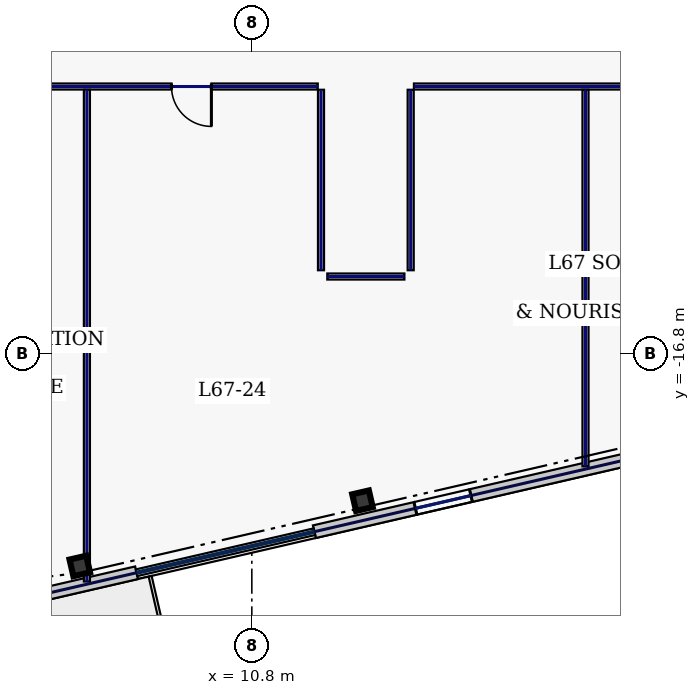
"""IFC4 building model, lengths in metres.
Left out: names, types, materials, properties, quantities, classifications, styles, units other than length and angle.
Written with IfcOpenShell. Run it as: python <this file> out.ifc"""

import sys

from ifc_helpers import new_model, si_unit, direction, frame, frame_2d, origin, origin_2d, place, context, subcontext, project, spatial, rectangle, hollow_rectangle, extrude, element, fill, save


model = new_model("IFC4")
c1 = context("Model", 3, precision=1e-05, world=origin(), true_north=direction((0.0, 1.0)))
c2 = subcontext(c1, "Body", "Model", "MODEL_VIEW")
j1 = project(units=[si_unit("LENGTHUNIT", "METRE"), si_unit("PLANEANGLEUNIT", "RADIAN")], contexts=[c1])
p1 = place(None, origin())
s1 = spatial("IfcSite", under=j1, at=p1, CompositionType="ELEMENT")
p2 = place(p1, origin())
s2 = spatial("IfcBuilding", under=s1, at=p2, CompositionType="ELEMENT")
p3 = place(p2, frame((0.0, 0.0, 289.0)))
s3 = spatial("IfcBuildingStorey", under=s2, at=p3, CompositionType="ELEMENT", Elevation=289.0)
for number, where, z_axis, x_axis in (
    (1, (6.273, -22.397, 0.0), (0.0, 0.0, 1.0), (0.974, 0.225, 0.0)),
    (2, (13.711, -20.68, 0.0), (0.0, 0.0, 1.0), (0.974, 0.225, 0.0)),
):
    element("IfcColumn", number, at=place(p3, frame(where, z_axis=z_axis, x_axis=x_axis)), inside=s3, PredefinedType="COLUMN", context=c2, shape_type="SweptSolid", body=[
        extrude(hollow_rectangle(XDim=0.45, YDim=0.45, WallThickness=0.022, at=origin_2d()), origin(), (0.0, 0.0, 1.0), 3.74),
    ])
p4 = place(p3, frame((-2.295, -24.898, 0.0), z_axis=(0.0, 0.0, 1.0), x_axis=(0.974370872906, 0.224947553958, 0.0)))
e3 = element("IfcWall", 3, at=p4, inside=s3, PredefinedType="STANDARD", context=c2, shape_type="SweptSolid", body=[
    extrude(rectangle(XDim=10.328, YDim=0.34, at=frame_2d((5.164, 0.0))), origin(), (0.0, 0.0, 1.0), 3.74),
])
p5 = place(p4, frame((4.394, 0.0, 0.0)))
e4 = element("IfcOpeningElement", 4, at=p5, cuts=e3, PredefinedType="OPENING", context=c2, shape_type="SweptSolid", body=[
    extrude(rectangle(XDim=1.4, YDim=2.2, at=frame_2d((0.7, 1.1))), frame((0.0, 0.18, 0.0), z_axis=(0.0, -1.0, 0.0), x_axis=(1.0, 0.0, 0.0)), (0.0, 0.0, 1.0), 0.36),
])
p6 = place(p4, frame((2.655, 0.0, 0.9)))
e5 = element("IfcOpeningElement", 5, at=p6, cuts=e3, PredefinedType="OPENING", context=c2, shape_type="SweptSolid", body=[
    extrude(rectangle(XDim=0.85, YDim=1.85, at=frame_2d((0.425, 0.925))), frame((0.0, 0.18, 0.0), z_axis=(0.0, -1.0, 0.0), x_axis=(1.0, 0.0, 0.0)), (0.0, 0.0, 1.0), 0.36),
])
p7 = place(p4, frame((6.774, 0.0, 0.9)))
e6 = element("IfcOpeningElement", 6, at=p7, cuts=e3, PredefinedType="OPENING", context=c2, shape_type="SweptSolid", body=[
    extrude(rectangle(XDim=0.85, YDim=1.85, at=frame_2d((0.425, 0.925))), frame((0.0, 0.18, 0.0), z_axis=(0.0, -1.0, 0.0), x_axis=(1.0, 0.0, 0.0)), (0.0, 0.0, 1.0), 0.36),
])
p8 = place(p3, frame((12.445, -21.495, 0.0), z_axis=(0.0, 0.0, 1.0), x_axis=(0.974369392164, 0.224953967767, 0.0)))
e7 = element("IfcWall", 7, at=p8, inside=s3, PredefinedType="STANDARD", context=c2, shape_type="SweptSolid", body=[
    extrude(rectangle(XDim=17.366, YDim=0.34, at=frame_2d((8.683, 0.0))), origin(), (0.0, 0.0, 1.0), 3.74),
])
p9 = place(p8, frame((2.729, 0.0, 0.9)))
e8 = element("IfcOpeningElement", 8, at=p9, cuts=e7, PredefinedType="OPENING", context=c2, shape_type="SweptSolid", body=[
    extrude(rectangle(XDim=1.5, YDim=2.0, at=frame_2d((0.75, 1.0))), frame((0.0, 0.18, 0.0), z_axis=(0.0, -1.0, 0.0), x_axis=(1.0, 0.0, 0.0)), (0.0, 0.0, 1.0), 0.36),
])
p10 = place(p8, frame((10.363, 0.0, 0.9)))
e9 = element("IfcOpeningElement", 9, at=p10, cuts=e7, PredefinedType="OPENING", context=c2, shape_type="SweptSolid", body=[
    extrude(rectangle(XDim=0.85, YDim=1.85, at=frame_2d((0.425, 0.925))), frame((0.0, 0.18, 0.0), z_axis=(0.0, -1.0, 0.0), x_axis=(1.0, 0.0, 0.0)), (0.0, 0.0, 1.0), 0.36),
])
p11 = place(p8, frame((13.875, 0.0, 0.9)))
e10 = element("IfcOpeningElement", 10, at=p11, cuts=e7, PredefinedType="OPENING", context=c2, shape_type="SweptSolid", body=[
    extrude(rectangle(XDim=1.5, YDim=2.0, at=frame_2d((0.75, 1.0))), frame((0.0, 0.18, 0.0), z_axis=(0.0, -1.0, 0.0), x_axis=(1.0, 0.0, 0.0)), (0.0, 0.0, 1.0), 0.36),
])
p12 = place(p3, frame((24.145, -9.78, 0.0), z_axis=(0.0, 0.0, 1.0), x_axis=(-1.0, 0.0, 0.0)))
e11 = element("IfcWall", 11, at=p12, inside=s3, PredefinedType="PARTITIONING", context=c2, shape_type="SweptSolid", body=[
    extrude(rectangle(XDim=9.08, YDim=0.16, at=frame_2d((4.54, 0.0))), origin(), (0.0, 0.0, 1.0), 3.74),
])
p13 = place(p12, frame((2.044, 0.0, 0.0)))
e12 = element("IfcOpeningElement", 12, at=p13, cuts=e11, PredefinedType="OPENING", context=c2, shape_type="SweptSolid", body=[
    extrude(rectangle(XDim=1.15, YDim=2.2, at=frame_2d((0.575, 1.1))), frame((0.0, 0.09, 0.0), z_axis=(0.0, -1.0, 0.0), x_axis=(1.0, 0.0, 0.0)), (0.0, 0.0, 1.0), 0.18),
])
p14 = place(p3, frame((14.98, -9.865, 0.0), z_axis=(0.0, 0.0, 1.0), x_axis=(0.0, -1.0, 0.0)))
e13 = element("IfcWall", 13, at=p14, inside=s3, PredefinedType="PARTITIONING", context=c2, shape_type="SweptSolid", body=[
    extrude(rectangle(XDim=4.75, YDim=0.16, at=frame_2d((2.375, 0.0))), origin(), (0.0, 0.0, 1.0), 3.74),
])
p15 = place(p3, frame((14.815, -14.78, 0.0), z_axis=(0.0, 0.0, 1.0), x_axis=(-1.0, 0.0, 0.0)))
e14 = element("IfcWall", 14, at=p15, inside=s3, PredefinedType="PARTITIONING", context=c2, shape_type="SweptSolid", body=[
    extrude(rectangle(XDim=2.03, YDim=0.16, at=frame_2d((1.015, 0.0))), origin(), (0.0, 0.0, 1.0), 3.74),
])
p16 = place(p3, frame((12.62, -14.615, 0.0), z_axis=(0.0, 0.0, 1.0), x_axis=(0.0, 1.0, 0.0)))
e15 = element("IfcWall", 15, at=p16, inside=s3, PredefinedType="PARTITIONING", context=c2, shape_type="SweptSolid", body=[
    extrude(rectangle(XDim=4.75, YDim=0.16, at=frame_2d((2.375, 0.0))), origin(), (0.0, 0.0, 1.0), 3.74),
])
p17 = place(p3, frame((12.535, -9.78, 0.0), z_axis=(0.0, 0.0, 1.0), x_axis=(-1.0, 0.0, 0.0)))
e16 = element("IfcWall", 16, at=p17, inside=s3, PredefinedType="PARTITIONING", context=c2, shape_type="SweptSolid", body=[
    extrude(rectangle(XDim=36.68, YDim=0.16, at=frame_2d((18.34, 0.0))), origin(), (0.0, 0.0, 1.0), 3.74),
])
p18 = place(p17, frame((33.856, 0.0, 0.0)))
e17 = element("IfcOpeningElement", 17, at=p18, cuts=e16, PredefinedType="OPENING", context=c2, shape_type="SweptSolid", body=[
    extrude(rectangle(XDim=1.05, YDim=2.2, at=frame_2d((0.525, 1.1))), frame((0.0, 0.09, 0.0), z_axis=(0.0, -1.0, 0.0), x_axis=(1.0, 0.0, 0.0)), (0.0, 0.0, 1.0), 0.18),
])
p19 = place(p17, frame((28.43, 0.0, 0.0)))
e18 = element("IfcOpeningElement", 18, at=p19, cuts=e16, PredefinedType="OPENING", context=c2, shape_type="SweptSolid", body=[
    extrude(rectangle(XDim=1.3, YDim=2.2, at=frame_2d((0.65, 1.1))), frame((0.0, 0.09, 0.0), z_axis=(0.0, -1.0, 0.0), x_axis=(1.0, 0.0, 0.0)), (0.0, 0.0, 1.0), 0.18),
])
p20 = place(p17, frame((22.64, 0.0, 0.0)))
e19 = element("IfcOpeningElement", 19, at=p20, cuts=e16, PredefinedType="OPENING", context=c2, shape_type="SweptSolid", body=[
    extrude(rectangle(XDim=1.3, YDim=2.2, at=frame_2d((0.65, 1.1))), frame((0.0, 0.09, 0.0), z_axis=(0.0, -1.0, 0.0), x_axis=(1.0, 0.0, 0.0)), (0.0, 0.0, 1.0), 0.18),
])
p21 = place(p17, frame((16.44, 0.0, 0.0)))
e20 = element("IfcOpeningElement", 20, at=p21, cuts=e16, PredefinedType="OPENING", context=c2, shape_type="SweptSolid", body=[
    extrude(rectangle(XDim=1.3, YDim=2.2, at=frame_2d((0.65, 1.1))), frame((0.0, 0.09, 0.0), z_axis=(0.0, -1.0, 0.0), x_axis=(1.0, 0.0, 0.0)), (0.0, 0.0, 1.0), 0.18),
])
p22 = place(p17, frame((9.385, 0.0, 0.0)))
e21 = element("IfcOpeningElement", 21, at=p22, cuts=e16, PredefinedType="OPENING", context=c2, shape_type="SweptSolid", body=[
    extrude(rectangle(XDim=0.95, YDim=2.2, at=frame_2d((0.475, 1.1))), frame((0.0, 0.09, 0.0), z_axis=(0.0, -1.0, 0.0), x_axis=(1.0, 0.0, 0.0)), (0.0, 0.0, 1.0), 0.18),
])
p23 = place(p17, frame((2.799, 0.0, 0.0)))
e22 = element("IfcOpeningElement", 22, at=p23, cuts=e16, PredefinedType="OPENING", context=c2, shape_type="SweptSolid", body=[
    extrude(rectangle(XDim=1.05, YDim=2.2, at=frame_2d((0.525, 1.1))), frame((0.0, 0.09, 0.0), z_axis=(0.0, -1.0, 0.0), x_axis=(1.0, 0.0, 0.0)), (0.0, 0.0, 1.0), 0.18),
])
p24 = place(p3, frame((6.46, -22.805, 0.0), z_axis=(0.0, 0.0, 1.0), x_axis=(0.0, 1.0, 0.0)))
e23 = element("IfcWall", 23, at=p24, inside=s3, PredefinedType="PARTITIONING", context=c2, shape_type="SweptSolid", body=[
    extrude(rectangle(XDim=12.94, YDim=0.16, at=frame_2d((6.47, 0.0))), origin(), (0.0, 0.0, 1.0), 3.74),
])
p25 = place(p3, frame((19.58, -19.776, 0.0), z_axis=(0.0, 0.0, 1.0), x_axis=(0.0, 1.0, 0.0)))
e24 = element("IfcWall", 24, at=p25, inside=s3, PredefinedType="PARTITIONING", context=c2, shape_type="SweptSolid", body=[
    extrude(rectangle(XDim=9.911, YDim=0.16, at=frame_2d((4.956, 0.0))), origin(), (0.0, 0.0, 1.0), 3.74),
])
p26 = place(p9, origin())
e25 = element("IfcWindow", 25, at=p26, inside=s3, PartitioningType="SINGLE_PANEL", PredefinedType="WINDOW", context=c2, shape_type="SweptSolid", body=[
    extrude(rectangle(XDim=1.5, YDim=2.0, at=frame_2d((0.75, 1.0))), frame((0.0, 0.03, 0.0), z_axis=(0.0, -1.0, 0.0), x_axis=(1.0, 0.0, 0.0)), (0.0, 0.0, 1.0), 0.06),
])
fill(e8, e25)
p27 = place(p23, origin())
e26 = element("IfcDoor", 26, at=p27, inside=s3, OperationType="SINGLE_SWING_LEFT", PredefinedType="DOOR", context=c2, shape_type="SweptSolid", body=[
    extrude(rectangle(XDim=1.05, YDim=2.2, at=frame_2d((0.525, 1.1))), frame((0.0, 0.025, 0.0), z_axis=(0.0, -1.0, 0.0), x_axis=(1.0, 0.0, 0.0)), (0.0, 0.0, 1.0), 0.05),
])
fill(e22, e26)
save(model, sys.argv[1])
